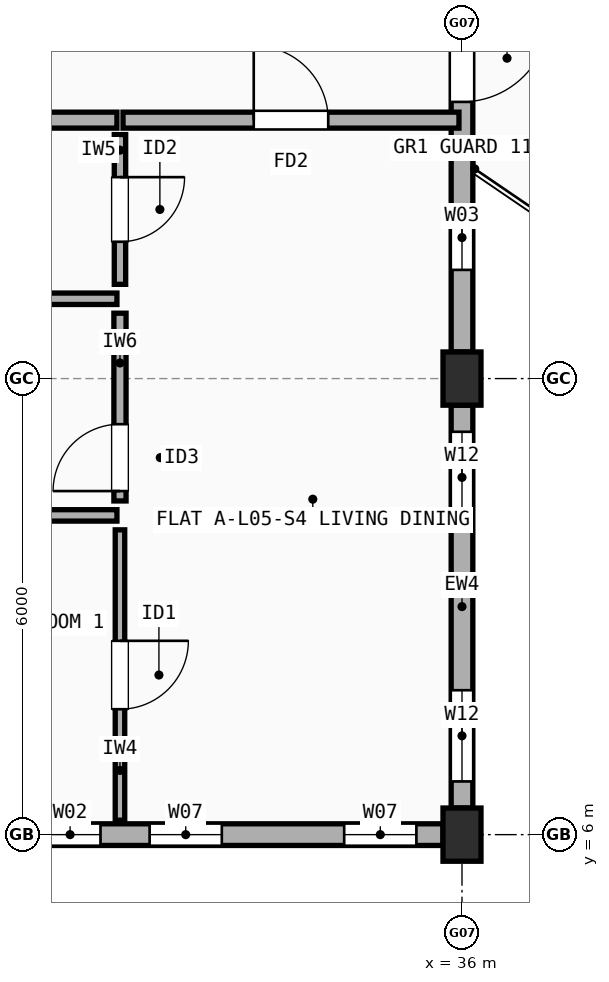
"""IFC4 building model, lengths in metres.
Left out: names, types, materials, properties, quantities, classifications, styles, units other than length and angle.
Written with IfcOpenShell. Run it as: python <this file> out.ifc"""

import sys

from ifc_helpers import new_model, si_unit, direction, frame, frame_2d, origin, origin_2d, place, context, subcontext, project, spatial, rectangle, extrude, element, fill, save


model = new_model("IFC4")
c1 = context("Model", 3, precision=1e-05, world=origin(), true_north=direction((0.0, 1.0)))
c2 = subcontext(c1, "Body", "Model", "MODEL_VIEW")
j1 = project(units=[si_unit("LENGTHUNIT", "METRE"), si_unit("PLANEANGLEUNIT", "RADIAN")], contexts=[c1])
p1 = place(None, origin())
s1 = spatial("IfcSite", under=j1, at=p1, CompositionType="ELEMENT")
p2 = place(p1, origin())
s2 = spatial("IfcBuilding", under=s1, at=p2, CompositionType="ELEMENT")
p3 = place(p2, frame((0.0, 0.0, 17.3)))
s3 = spatial("IfcBuildingStorey", under=s2, at=p3, CompositionType="ELEMENT", Elevation=17.3)
for number, where, z_axis, x_axis in (
    (1, (36.0, 6.0, 0.0), (0.0, 0.0, 1.0), (1.0, 0.0, 0.0)),
    (2, (36.0, 12.0, 0.0), (0.0, 0.0, 1.0), (1.0, 0.0, 0.0)),
):
    element("IfcColumn", number, at=place(p3, frame(where, z_axis=z_axis, x_axis=x_axis)), inside=s3, PredefinedType="COLUMN", context=c2, shape_type="SweptSolid", body=[
        extrude(rectangle(XDim=0.5, YDim=0.7, at=origin_2d()), origin(), (0.0, 0.0, 1.0), 2.965),
    ])
p4 = place(p3, frame((30.25, 6.0, 0.0), z_axis=(0.0, 0.0, 1.0), x_axis=(1.0, 0.0, 0.0)))
e3 = element("IfcWall", 3, at=p4, inside=s3, PredefinedType="STANDARD", context=c2, shape_type="SweptSolid", body=[
    extrude(rectangle(XDim=5.5, YDim=0.285, at=frame_2d((2.75, 0.0))), origin(), (0.0, 0.0, 1.0), 2.447),
])
p5 = place(p4, frame((1.64, 0.0, 0.9)))
e4 = element("IfcOpeningElement", 4, at=p5, cuts=e3, PredefinedType="OPENING", context=c2, shape_type="SweptSolid", body=[
    extrude(rectangle(XDim=0.95, YDim=1.35, at=frame_2d((0.475, 0.675))), frame((0.0, 0.152, 0.0), z_axis=(0.0, -1.0, 0.0), x_axis=(1.0, 0.0, 0.0)), (0.0, 0.0, 1.0), 0.305),
])
p6 = place(p4, frame((4.2, 0.0, 0.9)))
e5 = element("IfcOpeningElement", 5, at=p6, cuts=e3, PredefinedType="OPENING", context=c2, shape_type="SweptSolid", body=[
    extrude(rectangle(XDim=0.95, YDim=1.35, at=frame_2d((0.475, 0.675))), frame((0.0, 0.152, 0.0), z_axis=(0.0, -1.0, 0.0), x_axis=(1.0, 0.0, 0.0)), (0.0, 0.0, 1.0), 0.305),
])
p7 = place(p4, frame((0.194, 0.0, 0.9)))
e6 = element("IfcOpeningElement", 6, at=p7, cuts=e3, PredefinedType="OPENING", context=c2, shape_type="SweptSolid", body=[
    extrude(rectangle(XDim=0.8, YDim=1.2, at=frame_2d((0.4, 0.6))), frame((0.0, 0.152, 0.0), z_axis=(0.0, -1.0, 0.0), x_axis=(1.0, 0.0, 0.0)), (0.0, 0.0, 1.0), 0.305),
])
p8 = place(p3, frame((36.0, 6.35, 0.0), z_axis=(0.0, 0.0, 1.0), x_axis=(0.0, 1.0, 0.0)))
e7 = element("IfcWall", 7, at=p8, inside=s3, PredefinedType="STANDARD", context=c2, shape_type="SweptSolid", body=[
    extrude(rectangle(XDim=5.3, YDim=0.285, at=frame_2d((2.65, 0.0))), origin(), (0.0, 0.0, 1.0), 2.447),
])
p9 = place(p8, frame((0.35, 0.0, 0.9)))
e8 = element("IfcOpeningElement", 8, at=p9, cuts=e7, PredefinedType="OPENING", context=c2, shape_type="SweptSolid", body=[
    extrude(rectangle(XDim=1.2, YDim=1.35, at=frame_2d((0.6, 0.675))), frame((0.0, 0.152, 0.0), z_axis=(0.0, -1.0, 0.0), x_axis=(1.0, 0.0, 0.0)), (0.0, 0.0, 1.0), 0.305),
])
p10 = place(p8, frame((3.75, 0.0, 0.9)))
e9 = element("IfcOpeningElement", 9, at=p10, cuts=e7, PredefinedType="OPENING", context=c2, shape_type="SweptSolid", body=[
    extrude(rectangle(XDim=1.2, YDim=1.35, at=frame_2d((0.6, 0.675))), frame((0.0, 0.152, 0.0), z_axis=(0.0, -1.0, 0.0), x_axis=(1.0, 0.0, 0.0)), (0.0, 0.0, 1.0), 0.305),
])
p11 = place(p3, frame((36.0, 12.35, 0.0), z_axis=(0.0, 0.0, 1.0), x_axis=(0.0, 1.0, 0.0)))
e10 = element("IfcWall", 10, at=p11, inside=s3, PredefinedType="STANDARD", context=c2, shape_type="SweptSolid", body=[
    extrude(rectangle(XDim=5.3, YDim=0.285, at=frame_2d((2.65, 0.0))), origin(), (0.0, 0.0, 1.0), 2.447),
])
p12 = place(p11, frame((3.29, 0.0, 0.0)))
e11 = element("IfcOpeningElement", 11, at=p12, cuts=e10, PredefinedType="OPENING", context=c2, shape_type="SweptSolid", body=[
    extrude(rectangle(XDim=1.15, YDim=2.15, at=frame_2d((0.575, 1.075))), frame((0.0, 0.152, 0.0), z_axis=(0.0, -1.0, 0.0), x_axis=(1.0, 0.0, 0.0)), (0.0, 0.0, 1.0), 0.305),
])
p13 = place(p11, frame((1.08, 0.0, 0.9)))
e12 = element("IfcOpeningElement", 12, at=p13, cuts=e10, PredefinedType="OPENING", context=c2, shape_type="SweptSolid", body=[
    extrude(rectangle(XDim=0.85, YDim=1.25, at=frame_2d((0.425, 0.625))), frame((0.0, 0.152, 0.0), z_axis=(0.0, -1.0, 0.0), x_axis=(1.0, 0.0, 0.0)), (0.0, 0.0, 1.0), 0.305),
])
p14 = place(p3, frame((28.54, 15.4, 0.0), z_axis=(0.0, 0.0, 1.0), x_axis=(1.0, 0.0, 0.0)))
e13 = element("IfcWall", 13, at=p14, inside=s3, PredefinedType="SOLIDWALL", context=c2, shape_type="SweptSolid", body=[
    extrude(rectangle(XDim=2.92, YDim=0.21, at=frame_2d((1.46, 0.0))), origin(), (0.0, 0.0, 1.0), 2.447),
])
p15 = place(p3, frame((31.54, 15.4, 0.0), z_axis=(0.0, 0.0, 1.0), x_axis=(1.0, 0.0, 0.0)))
e14 = element("IfcWall", 14, at=p15, inside=s3, PredefinedType="SOLIDWALL", context=c2, shape_type="SweptSolid", body=[
    extrude(rectangle(XDim=4.42, YDim=0.21, at=frame_2d((2.21, 0.0))), origin(), (0.0, 0.0, 1.0), 2.447),
])
p16 = place(p15, frame((1.72, 0.0, 0.0)))
e15 = element("IfcOpeningElement", 15, at=p16, cuts=e14, PredefinedType="OPENING", context=c2, shape_type="SweptSolid", body=[
    extrude(rectangle(XDim=0.98, YDim=2.15, at=frame_2d((0.49, 1.075))), frame((0.0, 0.115, 0.0), z_axis=(0.0, -1.0, 0.0), x_axis=(1.0, 0.0, 0.0)), (0.0, 0.0, 1.0), 0.23),
])
p17 = place(p3, frame((31.5, 6.19, 0.0), z_axis=(0.0, 0.0, 1.0), x_axis=(0.0, 1.0, 0.0)))
e16 = element("IfcWall", 16, at=p17, inside=s3, PredefinedType="PARTITIONING", context=c2, shape_type="SweptSolid", body=[
    extrude(rectangle(XDim=3.82, YDim=0.125, at=frame_2d((1.91, 0.0))), origin(), (0.0, 0.0, 1.0), 2.965),
])
p18 = place(p17, frame((1.46, 0.0, 0.0)))
e17 = element("IfcOpeningElement", 17, at=p18, cuts=e16, PredefinedType="OPENING", context=c2, shape_type="SweptSolid", body=[
    extrude(rectangle(XDim=0.9, YDim=2.1, at=frame_2d((0.45, 1.05))), frame((0.0, 0.073, 0.0), z_axis=(0.0, -1.0, 0.0), x_axis=(1.0, 0.0, 0.0)), (0.0, 0.0, 1.0), 0.145),
])
p19 = place(p3, frame((31.5, 10.39, 0.0), z_axis=(0.0, 0.0, 1.0), x_axis=(0.0, 1.0, 0.0)))
e18 = element("IfcWall", 18, at=p19, inside=s3, PredefinedType="PLUMBINGWALL", context=c2, shape_type="SweptSolid", body=[
    extrude(rectangle(XDim=2.47, YDim=0.16, at=frame_2d((1.235, 0.0))), origin(), (0.0, 0.0, 1.0), 2.508),
])
p20 = place(p19, frame((0.13, 0.0, 0.0)))
e19 = element("IfcOpeningElement", 19, at=p20, cuts=e18, PredefinedType="OPENING", context=c2, shape_type="SweptSolid", body=[
    extrude(rectangle(XDim=0.88, YDim=2.1, at=frame_2d((0.44, 1.05))), frame((0.0, 0.09, 0.0), z_axis=(0.0, -1.0, 0.0), x_axis=(1.0, 0.0, 0.0)), (0.0, 0.0, 1.0), 0.18),
])
p21 = place(p3, frame((31.5, 13.24, 0.0), z_axis=(0.0, 0.0, 1.0), x_axis=(0.0, 1.0, 0.0)))
e20 = element("IfcWall", 20, at=p21, inside=s3, PredefinedType="PARTITIONING", context=c2, shape_type="SweptSolid", body=[
    extrude(rectangle(XDim=1.97, YDim=0.15, at=frame_2d((0.985, 0.0))), origin(), (0.0, 0.0, 1.0), 2.965),
])
p22 = place(p21, frame((0.56, 0.0, 0.0)))
e21 = element("IfcOpeningElement", 21, at=p22, cuts=e20, PredefinedType="OPENING", context=c2, shape_type="SweptSolid", body=[
    extrude(rectangle(XDim=0.85, YDim=2.1, at=frame_2d((0.425, 1.05))), frame((0.0, 0.085, 0.0), z_axis=(0.0, -1.0, 0.0), x_axis=(1.0, 0.0, 0.0)), (0.0, 0.0, 1.0), 0.17),
])
for number, where, z_axis, x_axis in (
    (22, (28.54, 10.2, 0.0), (0.0, 0.0, 1.0), (1.0, 0.0, 0.0)),
    (23, (28.54, 13.05, 0.0), (0.0, 0.0, 1.0), (1.0, 0.0, 0.0)),
):
    element("IfcWall", number, at=place(p3, frame(where, z_axis=z_axis, x_axis=x_axis)), inside=s3, PredefinedType="PARTITIONING", context=c2, shape_type="SweptSolid", body=[
        extrude(rectangle(XDim=2.92, YDim=0.15, at=frame_2d((1.46, 0.0))), origin(), (0.0, 0.0, 1.0), 2.447),
    ])
p23 = place(p5, origin())
e24 = element("IfcWindow", 24, at=p23, inside=s3, PartitioningType="SINGLE_PANEL", PredefinedType="WINDOW", context=c2, shape_type="SweptSolid", body=[
    extrude(rectangle(XDim=0.95, YDim=1.35, at=frame_2d((0.475, 0.675))), frame((0.0, 0.03, 0.0), z_axis=(0.0, -1.0, 0.0), x_axis=(1.0, 0.0, 0.0)), (0.0, 0.0, 1.0), 0.06),
])
fill(e4, e24)
p24 = place(p6, origin())
e25 = element("IfcWindow", 25, at=p24, inside=s3, PartitioningType="SINGLE_PANEL", PredefinedType="WINDOW", context=c2, shape_type="SweptSolid", body=[
    extrude(rectangle(XDim=0.95, YDim=1.35, at=frame_2d((0.475, 0.675))), frame((0.0, 0.03, 0.0), z_axis=(0.0, -1.0, 0.0), x_axis=(1.0, 0.0, 0.0)), (0.0, 0.0, 1.0), 0.06),
])
fill(e5, e25)
p25 = place(p9, origin())
e26 = element("IfcWindow", 26, at=p25, inside=s3, PartitioningType="SINGLE_PANEL", PredefinedType="WINDOW", context=c2, shape_type="SweptSolid", body=[
    extrude(rectangle(XDim=1.2, YDim=1.35, at=frame_2d((0.6, 0.675))), frame((0.0, 0.03, 0.0), z_axis=(0.0, -1.0, 0.0), x_axis=(1.0, 0.0, 0.0)), (0.0, 0.0, 1.0), 0.06),
])
fill(e8, e26)
p26 = place(p10, origin())
e27 = element("IfcWindow", 27, at=p26, inside=s3, PartitioningType="SINGLE_PANEL", PredefinedType="WINDOW", context=c2, shape_type="SweptSolid", body=[
    extrude(rectangle(XDim=1.2, YDim=1.35, at=frame_2d((0.6, 0.675))), frame((0.0, 0.03, 0.0), z_axis=(0.0, -1.0, 0.0), x_axis=(1.0, 0.0, 0.0)), (0.0, 0.0, 1.0), 0.06),
])
fill(e9, e27)
p27 = place(p12, frame((1.15, 0.0, 0.0), z_axis=(0.0, 0.0, 1.0), x_axis=(-1.0, 0.0, 0.0)))
e28 = element("IfcDoor", 28, at=p27, inside=s3, OperationType="SINGLE_SWING_RIGHT", PredefinedType="DOOR", context=c2, shape_type="SweptSolid", body=[
    extrude(rectangle(XDim=1.15, YDim=2.15, at=frame_2d((0.575, 1.075))), frame((0.0, 0.025, 0.0), z_axis=(0.0, -1.0, 0.0), x_axis=(1.0, 0.0, 0.0)), (0.0, 0.0, 1.0), 0.05),
])
fill(e11, e28)
p28 = place(p13, origin())
e29 = element("IfcWindow", 29, at=p28, inside=s3, PartitioningType="SINGLE_PANEL", PredefinedType="WINDOW", context=c2, shape_type="SweptSolid", body=[
    extrude(rectangle(XDim=0.85, YDim=1.25, at=frame_2d((0.425, 0.625))), frame((0.0, 0.03, 0.0), z_axis=(0.0, -1.0, 0.0), x_axis=(1.0, 0.0, 0.0)), (0.0, 0.0, 1.0), 0.06),
])
fill(e12, e29)
p29 = place(p7, origin())
e30 = element("IfcWindow", 30, at=p29, inside=s3, PartitioningType="SINGLE_PANEL", PredefinedType="WINDOW", context=c2, shape_type="SweptSolid", body=[
    extrude(rectangle(XDim=0.8, YDim=1.2, at=frame_2d((0.4, 0.6))), frame((0.0, 0.03, 0.0), z_axis=(0.0, -1.0, 0.0), x_axis=(1.0, 0.0, 0.0)), (0.0, 0.0, 1.0), 0.06),
])
fill(e6, e30)
p30 = place(p16, origin())
e31 = element("IfcDoor", 31, at=p30, inside=s3, OperationType="SINGLE_SWING_LEFT", PredefinedType="DOOR", context=c2, shape_type="SweptSolid", body=[
    extrude(rectangle(XDim=0.98, YDim=2.15, at=frame_2d((0.49, 1.075))), frame((0.0, 0.025, 0.0), z_axis=(0.0, -1.0, 0.0), x_axis=(1.0, 0.0, 0.0)), (0.0, 0.0, 1.0), 0.05),
])
fill(e15, e31)
p31 = place(p18, origin())
e32 = element("IfcDoor", 32, at=p31, inside=s3, OperationType="SINGLE_SWING_RIGHT", PredefinedType="DOOR", context=c2, shape_type="SweptSolid", body=[
    extrude(rectangle(XDim=0.9, YDim=2.1, at=frame_2d((0.45, 1.05))), frame((0.0, 0.025, 0.0), z_axis=(0.0, -1.0, 0.0), x_axis=(1.0, 0.0, 0.0)), (0.0, 0.0, 1.0), 0.05),
])
fill(e17, e32)
p32 = place(p20, origin())
e33 = element("IfcDoor", 33, at=p32, inside=s3, OperationType="SINGLE_SWING_LEFT", PredefinedType="DOOR", context=c2, shape_type="SweptSolid", body=[
    extrude(rectangle(XDim=0.88, YDim=2.1, at=frame_2d((0.44, 1.05))), frame((0.0, 0.025, 0.0), z_axis=(0.0, -1.0, 0.0), x_axis=(1.0, 0.0, 0.0)), (0.0, 0.0, 1.0), 0.05),
])
fill(e19, e33)
p33 = place(p22, origin())
e34 = element("IfcDoor", 34, at=p33, inside=s3, OperationType="SINGLE_SWING_RIGHT", PredefinedType="DOOR", context=c2, shape_type="SweptSolid", body=[
    extrude(rectangle(XDim=0.85, YDim=2.1, at=frame_2d((0.425, 1.05))), frame((0.0, 0.025, 0.0), z_axis=(0.0, -1.0, 0.0), x_axis=(1.0, 0.0, 0.0)), (0.0, 0.0, 1.0), 0.05),
])
fill(e21, e34)
save(model, sys.argv[1])
